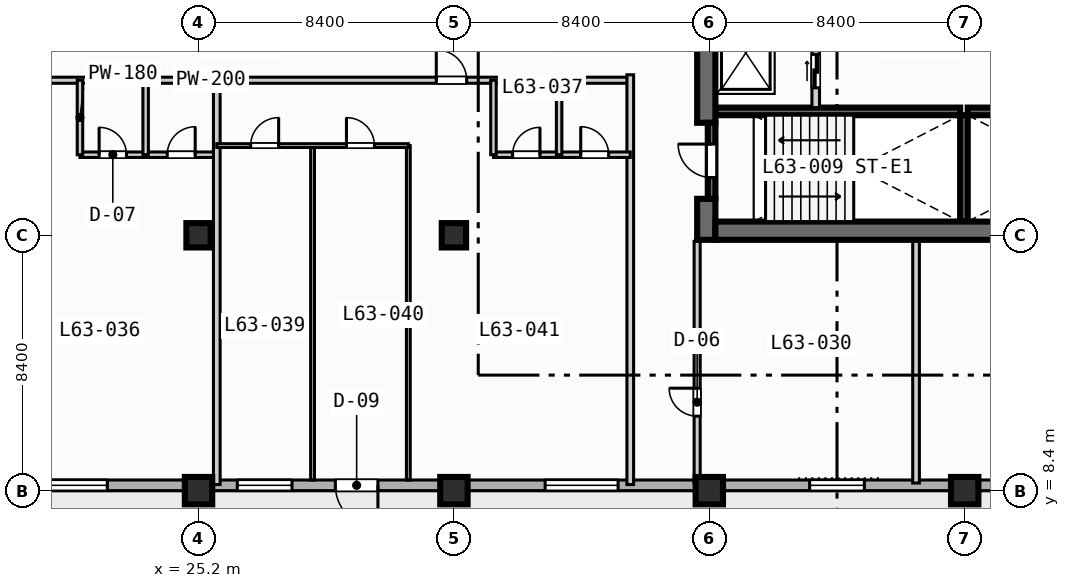
"""IFC4 building model, lengths in metres.
Left out: names, types, materials, properties, quantities, classifications, styles, units other than length and angle.
Written with IfcOpenShell. Run it as: python <this file> out.ifc"""

import sys

from ifc_helpers import new_model, si_unit, direction, frame, frame_2d, origin, origin_2d, place, context, subcontext, project, spatial, rectangle, extrude, element, fill, save


model = new_model("IFC4")
c1 = context("Model", 3, precision=1e-05, world=origin(), true_north=direction((0.0, 1.0)))
c2 = subcontext(c1, "Body", "Model", "MODEL_VIEW")
j1 = project(units=[si_unit("LENGTHUNIT", "METRE"), si_unit("PLANEANGLEUNIT", "RADIAN")], contexts=[c1])
p1 = place(None, origin())
s1 = spatial("IfcSite", under=j1, at=p1, CompositionType="ELEMENT")
p2 = place(p1, origin())
s2 = spatial("IfcBuilding", under=s1, at=p2, CompositionType="ELEMENT")
p3 = place(p2, frame((0.0, 0.0, 256.4)))
s3 = spatial("IfcBuildingStorey", under=s2, at=p3, CompositionType="ELEMENT", Elevation=256.4)
for number, where, z_axis, x_axis in (
    (1, (42.2, 20.875, 0.0), (0.0, 0.0, 1.0), (1.0, 0.0, 0.0)),
    (2, (50.5, 20.875, 0.0), (0.0, 0.0, 1.0), (1.0, 0.0, 0.0)),
):
    element("IfcWall", number, at=place(p3, frame(where, z_axis=z_axis, x_axis=x_axis)), inside=s3, PredefinedType="SOLIDWALL", context=c2, shape_type="SweptSolid", body=[
        extrude(rectangle(XDim=8.05, YDim=0.25, at=frame_2d((4.025, 0.0))), origin(), (0.0, 0.0, 1.0), 3.47),
    ])
p4 = place(p3, frame((50.375, 17.25, 0.0), z_axis=(0.0, 0.0, 1.0), x_axis=(0.0, 1.0, 0.0)))
e3 = element("IfcWall", 3, at=p4, inside=s3, PredefinedType="SOLIDWALL", context=c2, shape_type="SweptSolid", body=[
    extrude(rectangle(XDim=3.5, YDim=0.25, at=frame_2d((1.75, 0.0))), origin(), (0.0, 0.0, 1.0), 3.47),
])
p5 = place(p3, frame((41.9, 16.65, 0.0), z_axis=(0.0, 0.0, 1.0), x_axis=(0.0, 1.0, 0.0)))
e4 = element("IfcWall", 4, at=p5, inside=s3, PredefinedType="SHEAR", context=c2, shape_type="SweptSolid", body=[
    extrude(rectangle(XDim=1.35, YDim=0.6, at=frame_2d((0.675, 0.0))), origin(), (0.0, 0.0, 1.0), 3.47),
])
p6 = place(p3, frame((41.9, 20.5, 0.0), z_axis=(0.0, 0.0, 1.0), x_axis=(0.0, 1.0, 0.0)))
e5 = element("IfcWall", 5, at=p6, inside=s3, PredefinedType="SHEAR", context=c2, shape_type="SweptSolid", body=[
    extrude(rectangle(XDim=5.0, YDim=0.6, at=frame_2d((2.5, 0.0))), origin(), (0.0, 0.0, 1.0), 3.47),
])
p7 = place(p3, frame((42.2, 16.95, 0.0), z_axis=(0.0, 0.0, 1.0), x_axis=(1.0, 0.0, 0.0)))
e6 = element("IfcWall", 6, at=p7, inside=s3, PredefinedType="SHEAR", context=c2, shape_type="SweptSolid", body=[
    extrude(rectangle(XDim=16.35, YDim=0.6, at=frame_2d((8.175, 0.0))), origin(), (0.0, 0.0, 1.0), 3.47),
])
p8 = place(p3, frame((25.2, 8.4, 0.0), z_axis=(0.0, 0.0, 1.0), x_axis=(1.0, 0.0, 0.0)))
e7 = element("IfcColumn", 7, at=p8, inside=s3, PredefinedType="COLUMN", context=c2, shape_type="SweptSolid", body=[
    extrude(rectangle(XDim=0.9, YDim=0.9, at=origin_2d()), origin(), (0.0, 0.0, 1.0), 3.7),
])
p9 = place(p3, frame((25.2, 16.8, 0.0), z_axis=(0.0, 0.0, 1.0), x_axis=(1.0, 0.0, 0.0)))
e8 = element("IfcColumn", 8, at=p9, inside=s3, PredefinedType="COLUMN", context=c2, shape_type="SweptSolid", body=[
    extrude(rectangle(XDim=0.8, YDim=0.8, at=origin_2d()), origin(), (0.0, 0.0, 1.0), 3.7),
])
p10 = place(p3, frame((33.6, 8.4, 0.0), z_axis=(0.0, 0.0, 1.0), x_axis=(1.0, 0.0, 0.0)))
e9 = element("IfcColumn", 9, at=p10, inside=s3, PredefinedType="COLUMN", context=c2, shape_type="SweptSolid", body=[
    extrude(rectangle(XDim=0.9, YDim=0.9, at=origin_2d()), origin(), (0.0, 0.0, 1.0), 3.7),
])
p11 = place(p3, frame((33.6, 16.8, 0.0), z_axis=(0.0, 0.0, 1.0), x_axis=(1.0, 0.0, 0.0)))
e10 = element("IfcColumn", 10, at=p11, inside=s3, PredefinedType="COLUMN", context=c2, shape_type="SweptSolid", body=[
    extrude(rectangle(XDim=0.8, YDim=0.8, at=origin_2d()), origin(), (0.0, 0.0, 1.0), 3.7),
])
for number, where, z_axis, x_axis in (
    (11, (42.0, 8.4, 0.0), (0.0, 0.0, 1.0), (1.0, 0.0, 0.0)),
    (12, (50.4, 8.4, 0.0), (0.0, 0.0, 1.0), (1.0, 0.0, 0.0)),
):
    element("IfcColumn", number, at=place(p3, frame(where, z_axis=z_axis, x_axis=x_axis)), inside=s3, PredefinedType="COLUMN", context=c2, shape_type="SweptSolid", body=[
        extrude(rectangle(XDim=0.9, YDim=0.9, at=origin_2d()), origin(), (0.0, 0.0, 1.0), 3.7),
    ])
p12 = place(p3, frame((72.425, 8.575, 0.0), z_axis=(0.0, 0.0, 1.0), x_axis=(-1.0, 0.0, 0.0)))
e13 = element("IfcWall", 13, at=p12, inside=s3, PredefinedType="STANDARD", context=c2, shape_type="SweptSolid", body=[
    extrude(rectangle(XDim=60.85, YDim=0.35, at=frame_2d((30.425, 0.0))), origin(), (0.0, 0.0, 1.0), 3.47),
])
p13 = place(p12, frame((41.325, 0.0, 0.0)))
e14 = element("IfcOpeningElement", 14, at=p13, cuts=e13, PredefinedType="OPENING", context=c2, shape_type="SweptSolid", body=[
    extrude(rectangle(XDim=1.4, YDim=2.2, at=frame_2d((0.7, 1.1))), frame((0.0, 0.185, 0.0), z_axis=(0.0, -1.0, 0.0), x_axis=(1.0, 0.0, 0.0)), (0.0, 0.0, 1.0), 0.37),
])
p14 = place(p12, frame((50.225, 0.0, 0.85)))
e15 = element("IfcOpeningElement", 15, at=p14, cuts=e13, PredefinedType="OPENING", context=c2, shape_type="SweptSolid", body=[
    extrude(rectangle(XDim=2.4, YDim=1.95, at=frame_2d((1.2, 0.975))), frame((0.0, 0.185, 0.0), z_axis=(0.0, -1.0, 0.0), x_axis=(1.0, 0.0, 0.0)), (0.0, 0.0, 1.0), 0.37),
])
p15 = place(p12, frame((33.425, 0.0, 0.85)))
e16 = element("IfcOpeningElement", 16, at=p15, cuts=e13, PredefinedType="OPENING", context=c2, shape_type="SweptSolid", body=[
    extrude(rectangle(XDim=2.4, YDim=1.95, at=frame_2d((1.2, 0.975))), frame((0.0, 0.185, 0.0), z_axis=(0.0, -1.0, 0.0), x_axis=(1.0, 0.0, 0.0)), (0.0, 0.0, 1.0), 0.37),
])
p16 = place(p12, frame((25.325, 0.0, 0.85)))
e17 = element("IfcOpeningElement", 17, at=p16, cuts=e13, PredefinedType="OPENING", context=c2, shape_type="SweptSolid", body=[
    extrude(rectangle(XDim=1.8, YDim=1.8, at=frame_2d((0.9, 0.9))), frame((0.0, 0.185, 0.0), z_axis=(0.0, -1.0, 0.0), x_axis=(1.0, 0.0, 0.0)), (0.0, 0.0, 1.0), 0.37),
])
p17 = place(p12, frame((58.15, 0.0, 0.85)))
e18 = element("IfcOpeningElement", 18, at=p17, cuts=e13, PredefinedType="OPENING", context=c2, shape_type="SweptSolid", body=[
    extrude(rectangle(XDim=1.8, YDim=1.8, at=frame_2d((0.9, 0.9))), frame((0.0, 0.185, 0.0), z_axis=(0.0, -1.0, 0.0), x_axis=(1.0, 0.0, 0.0)), (0.0, 0.0, 1.0), 0.37),
])
p18 = place(p12, frame((56.29, 0.0, 0.85)))
e19 = element("IfcOpeningElement", 19, at=p18, cuts=e13, PredefinedType="OPENING", context=c2, shape_type="SweptSolid", body=[
    extrude(rectangle(XDim=0.72, YDim=1.8, at=frame_2d((0.36, 0.9))), frame((0.0, 0.185, 0.0), z_axis=(0.0, -1.0, 0.0), x_axis=(1.0, 0.0, 0.0)), (0.0, 0.0, 1.0), 0.37),
])
p19 = place(p12, frame((44.15, 0.0, 0.85)))
e20 = element("IfcOpeningElement", 20, at=p19, cuts=e13, PredefinedType="OPENING", context=c2, shape_type="SweptSolid", body=[
    extrude(rectangle(XDim=1.8, YDim=1.8, at=frame_2d((0.9, 0.9))), frame((0.0, 0.185, 0.0), z_axis=(0.0, -1.0, 0.0), x_axis=(1.0, 0.0, 0.0)), (0.0, 0.0, 1.0), 0.37),
])
p20 = place(p3, frame((42.075, 18.0, 0.0), z_axis=(0.0, 0.0, 1.0), x_axis=(0.0, 1.0, 0.0)))
e21 = element("IfcWall", 21, at=p20, inside=s3, PredefinedType="SOLIDWALL", context=c2, shape_type="SweptSolid", body=[
    extrude(rectangle(XDim=2.5, YDim=0.25, at=frame_2d((1.25, 0.0))), origin(), (0.0, 0.0, 1.0), 3.47),
])
p21 = place(p20, frame((0.7, 0.0, 0.0)))
e22 = element("IfcOpeningElement", 22, at=p21, cuts=e21, PredefinedType="OPENING", context=c2, shape_type="SweptSolid", body=[
    extrude(rectangle(XDim=1.1, YDim=2.15, at=frame_2d((0.55, 1.075))), frame((0.0, 0.135, 0.0), z_axis=(0.0, -1.0, 0.0), x_axis=(1.0, 0.0, 0.0)), (0.0, 0.0, 1.0), 0.27),
])
p22 = place(p3, frame((45.5, 21.0, 0.0), z_axis=(0.0, 0.0, 1.0), x_axis=(0.0, 1.0, 0.0)))
e23 = element("IfcWall", 23, at=p22, inside=s3, PredefinedType="SOLIDWALL", context=c2, shape_type="SweptSolid", body=[
    extrude(rectangle(XDim=4.15, YDim=0.25, at=frame_2d((2.075, 0.0))), origin(), (0.0, 0.0, 1.0), 3.47),
])
p23 = place(p22, frame((0.65, 0.0, 0.0)))
e24 = element("IfcOpeningElement", 24, at=p23, cuts=e23, PredefinedType="OPENING", context=c2, shape_type="SweptSolid", body=[
    extrude(rectangle(XDim=1.1, YDim=2.15, at=frame_2d((0.55, 1.075))), frame((0.0, 0.135, 0.0), z_axis=(0.0, -1.0, 0.0), x_axis=(1.0, 0.0, 0.0)), (0.0, 0.0, 1.0), 0.27),
])
p24 = place(p3, frame((41.6, 8.65, 0.0), z_axis=(0.0, 0.0, 1.0), x_axis=(0.0, 1.0, 0.0)))
e25 = element("IfcWall", 25, at=p24, inside=s3, PredefinedType="PARTITIONING", context=c2, shape_type="SweptSolid", body=[
    extrude(rectangle(XDim=7.95, YDim=0.2, at=frame_2d((3.975, 0.0))), origin(), (0.0, 0.0, 1.0), 3.47),
])
p25 = place(p24, frame((2.2, 0.0, 0.0)))
e26 = element("IfcOpeningElement", 26, at=p25, cuts=e25, PredefinedType="OPENING", context=c2, shape_type="SweptSolid", body=[
    extrude(rectangle(XDim=0.92, YDim=2.1, at=frame_2d((0.46, 1.05))), frame((0.0, 0.11, 0.0), z_axis=(0.0, -1.0, 0.0), x_axis=(1.0, 0.0, 0.0)), (0.0, 0.0, 1.0), 0.22),
])
p26 = place(p3, frame((48.8, 8.65, 0.0), z_axis=(0.0, 0.0, 1.0), x_axis=(0.0, 1.0, 0.0)))
e27 = element("IfcWall", 27, at=p26, inside=s3, PredefinedType="PARTITIONING", context=c2, shape_type="SweptSolid", body=[
    extrude(rectangle(XDim=7.95, YDim=0.22, at=frame_2d((3.975, 0.0))), origin(), (0.0, 0.0, 1.0), 3.47),
])
p27 = place(p3, frame((11.8, 21.9, 0.0), z_axis=(0.0, 0.0, 1.0), x_axis=(1.0, 0.0, 0.0)))
e28 = element("IfcWall", 28, at=p27, inside=s3, PredefinedType="PARTITIONING", context=c2, shape_type="SweptSolid", body=[
    extrude(rectangle(XDim=27.6, YDim=0.2, at=frame_2d((13.8, 0.0))), origin(), (0.0, 0.0, 1.0), 3.47),
])
p28 = place(p27, frame((7.42, 0.0, 0.0)))
e29 = element("IfcOpeningElement", 29, at=p28, cuts=e28, PredefinedType="OPENING", context=c2, shape_type="SweptSolid", body=[
    extrude(rectangle(XDim=1.0, YDim=2.15, at=frame_2d((0.5, 1.075))), frame((0.0, 0.11, 0.0), z_axis=(0.0, -1.0, 0.0), x_axis=(1.0, 0.0, 0.0)), (0.0, 0.0, 1.0), 0.22),
])
p29 = place(p27, frame((21.22, 0.0, 0.0)))
e30 = element("IfcOpeningElement", 30, at=p29, cuts=e28, PredefinedType="OPENING", context=c2, shape_type="SweptSolid", body=[
    extrude(rectangle(XDim=1.0, YDim=2.15, at=frame_2d((0.5, 1.075))), frame((0.0, 0.11, 0.0), z_axis=(0.0, -1.0, 0.0), x_axis=(1.0, 0.0, 0.0)), (0.0, 0.0, 1.0), 0.22),
])
p30 = place(p3, frame((21.3, 19.45, 0.0), z_axis=(0.0, 0.0, 1.0), x_axis=(1.0, 0.0, 0.0)))
e31 = element("IfcWall", 31, at=p30, inside=s3, PredefinedType="PLUMBINGWALL", context=c2, shape_type="SweptSolid", body=[
    extrude(rectangle(XDim=4.5, YDim=0.18, at=frame_2d((2.25, 0.0))), origin(), (0.0, 0.0, 1.0), 3.47),
])
p31 = place(p30, frame((0.63, 0.0, 0.0)))
e32 = element("IfcOpeningElement", 32, at=p31, cuts=e31, PredefinedType="OPENING", context=c2, shape_type="SweptSolid", body=[
    extrude(rectangle(XDim=0.9, YDim=2.1, at=frame_2d((0.45, 1.05))), frame((0.0, 0.1, 0.0), z_axis=(0.0, -1.0, 0.0), x_axis=(1.0, 0.0, 0.0)), (0.0, 0.0, 1.0), 0.2),
])
p32 = place(p30, frame((2.87, 0.0, 0.0)))
e33 = element("IfcOpeningElement", 33, at=p32, cuts=e31, PredefinedType="OPENING", context=c2, shape_type="SweptSolid", body=[
    extrude(rectangle(XDim=0.92, YDim=2.1, at=frame_2d((0.46, 1.05))), frame((0.0, 0.1, 0.0), z_axis=(0.0, -1.0, 0.0), x_axis=(1.0, 0.0, 0.0)), (0.0, 0.0, 1.0), 0.2),
])
for number, where, z_axis, x_axis in (
    (34, (21.3, 19.45, 0.0), (0.0, 0.0, 1.0), (0.0, 1.0, 0.0)),
    (35, (23.46, 19.45, 0.0), (0.0, 0.0, 1.0), (0.0, 1.0, 0.0)),
):
    element("IfcWall", number, at=place(p3, frame(where, z_axis=z_axis, x_axis=x_axis)), inside=s3, PredefinedType="PLUMBINGWALL", context=c2, shape_type="SweptSolid", body=[
        extrude(rectangle(XDim=2.45, YDim=0.18, at=frame_2d((1.225, 0.0))), origin(), (0.0, 0.0, 1.0), 3.47),
    ])
for number, where, z_axis, x_axis in (
    (36, (25.8, 8.6, 0.0), (0.0, 0.0, 1.0), (0.0, 1.0, 0.0)),
    (37, (39.4, 8.6, 0.0), (0.0, 0.0, 1.0), (0.0, 1.0, 0.0)),
):
    element("IfcWall", number, at=place(p3, frame(where, z_axis=z_axis, x_axis=x_axis)), inside=s3, PredefinedType="PARTITIONING", context=c2, shape_type="SweptSolid", body=[
        extrude(rectangle(XDim=13.48, YDim=0.22, at=frame_2d((6.74, 0.0))), origin(), (0.0, 0.0, 1.0), 3.47),
    ])
p33 = place(p3, frame((34.9, 19.45, 0.0), z_axis=(0.0, 0.0, 1.0), x_axis=(1.0, 0.0, 0.0)))
e38 = element("IfcWall", 38, at=p33, inside=s3, PredefinedType="PLUMBINGWALL", context=c2, shape_type="SweptSolid", body=[
    extrude(rectangle(XDim=4.5, YDim=0.18, at=frame_2d((2.25, 0.0))), origin(), (0.0, 0.0, 1.0), 3.47),
])
p34 = place(p33, frame((0.63, 0.0, 0.0)))
e39 = element("IfcOpeningElement", 39, at=p34, cuts=e38, PredefinedType="OPENING", context=c2, shape_type="SweptSolid", body=[
    extrude(rectangle(XDim=0.9, YDim=2.1, at=frame_2d((0.45, 1.05))), frame((0.0, 0.1, 0.0), z_axis=(0.0, -1.0, 0.0), x_axis=(1.0, 0.0, 0.0)), (0.0, 0.0, 1.0), 0.2),
])
p35 = place(p33, frame((2.87, 0.0, 0.0)))
e40 = element("IfcOpeningElement", 40, at=p35, cuts=e38, PredefinedType="OPENING", context=c2, shape_type="SweptSolid", body=[
    extrude(rectangle(XDim=0.92, YDim=2.1, at=frame_2d((0.46, 1.05))), frame((0.0, 0.1, 0.0), z_axis=(0.0, -1.0, 0.0), x_axis=(1.0, 0.0, 0.0)), (0.0, 0.0, 1.0), 0.2),
])
for number, where, z_axis, x_axis in (
    (41, (34.9, 19.45, 0.0), (0.0, 0.0, 1.0), (0.0, 1.0, 0.0)),
    (42, (37.06, 19.45, 0.0), (0.0, 0.0, 1.0), (0.0, 1.0, 0.0)),
):
    element("IfcWall", number, at=place(p3, frame(where, z_axis=z_axis, x_axis=x_axis)), inside=s3, PredefinedType="PLUMBINGWALL", context=c2, shape_type="SweptSolid", body=[
        extrude(rectangle(XDim=2.45, YDim=0.18, at=frame_2d((1.225, 0.0))), origin(), (0.0, 0.0, 1.0), 3.47),
    ])
for number, where, z_axis, x_axis in (
    (43, (28.95, 8.75, 0.0), (0.0, 0.0, 1.0), (0.0, 1.0, 0.0)),
    (44, (32.1, 8.75, 0.0), (0.0, 0.0, 1.0), (0.0, 1.0, 0.0)),
):
    element("IfcWall", number, at=place(p3, frame(where, z_axis=z_axis, x_axis=x_axis)), inside=s3, PredefinedType="PARTITIONING", context=c2, shape_type="SweptSolid", body=[
        extrude(rectangle(XDim=11.0, YDim=0.125, at=frame_2d((5.5, 0.0))), origin(), (0.0, 0.0, 1.0), 3.47),
    ])
p36 = place(p3, frame((25.8, 19.75, 0.0), z_axis=(0.0, 0.0, 1.0), x_axis=(1.0, 0.0, 0.0)))
e45 = element("IfcWall", 45, at=p36, inside=s3, PredefinedType="PARTITIONING", context=c2, shape_type="SweptSolid", body=[
    extrude(rectangle(XDim=6.3, YDim=0.125, at=frame_2d((3.15, 0.0))), origin(), (0.0, 0.0, 1.0), 3.47),
])
p37 = place(p36, frame((1.115, 0.0, 0.0)))
e46 = element("IfcOpeningElement", 46, at=p37, cuts=e45, PredefinedType="OPENING", context=c2, shape_type="SweptSolid", body=[
    extrude(rectangle(XDim=0.92, YDim=2.1, at=frame_2d((0.46, 1.05))), frame((0.0, 0.073, 0.0), z_axis=(0.0, -1.0, 0.0), x_axis=(1.0, 0.0, 0.0)), (0.0, 0.0, 1.0), 0.145),
])
p38 = place(p36, frame((4.265, 0.0, 0.0)))
e47 = element("IfcOpeningElement", 47, at=p38, cuts=e45, PredefinedType="OPENING", context=c2, shape_type="SweptSolid", body=[
    extrude(rectangle(XDim=0.92, YDim=2.1, at=frame_2d((0.46, 1.05))), frame((0.0, 0.073, 0.0), z_axis=(0.0, -1.0, 0.0), x_axis=(1.0, 0.0, 0.0)), (0.0, 0.0, 1.0), 0.145),
])
p39 = place(p13, origin())
e48 = element("IfcDoor", 48, at=p39, inside=s3, OperationType="SINGLE_SWING_LEFT", PredefinedType="DOOR", context=c2, shape_type="SweptSolid", body=[
    extrude(rectangle(XDim=1.4, YDim=2.2, at=frame_2d((0.7, 1.1))), frame((0.0, 0.025, 0.0), z_axis=(0.0, -1.0, 0.0), x_axis=(1.0, 0.0, 0.0)), (0.0, 0.0, 1.0), 0.05),
])
fill(e14, e48)
p40 = place(p14, origin())
e49 = element("IfcWindow", 49, at=p40, inside=s3, PartitioningType="SINGLE_PANEL", PredefinedType="WINDOW", context=c2, shape_type="SweptSolid", body=[
    extrude(rectangle(XDim=2.4, YDim=1.95, at=frame_2d((1.2, 0.975))), frame((0.0, 0.03, 0.0), z_axis=(0.0, -1.0, 0.0), x_axis=(1.0, 0.0, 0.0)), (0.0, 0.0, 1.0), 0.06),
])
fill(e15, e49)
p41 = place(p15, origin())
e50 = element("IfcWindow", 50, at=p41, inside=s3, PartitioningType="SINGLE_PANEL", PredefinedType="WINDOW", context=c2, shape_type="SweptSolid", body=[
    extrude(rectangle(XDim=2.4, YDim=1.95, at=frame_2d((1.2, 0.975))), frame((0.0, 0.03, 0.0), z_axis=(0.0, -1.0, 0.0), x_axis=(1.0, 0.0, 0.0)), (0.0, 0.0, 1.0), 0.06),
])
fill(e16, e50)
p42 = place(p16, origin())
e51 = element("IfcWindow", 51, at=p42, inside=s3, PartitioningType="SINGLE_PANEL", PredefinedType="WINDOW", context=c2, shape_type="SweptSolid", body=[
    extrude(rectangle(XDim=1.8, YDim=1.8, at=frame_2d((0.9, 0.9))), frame((0.0, 0.03, 0.0), z_axis=(0.0, -1.0, 0.0), x_axis=(1.0, 0.0, 0.0)), (0.0, 0.0, 1.0), 0.06),
])
fill(e17, e51)
p43 = place(p19, origin())
e52 = element("IfcWindow", 52, at=p43, inside=s3, PartitioningType="SINGLE_PANEL", PredefinedType="WINDOW", context=c2, shape_type="SweptSolid", body=[
    extrude(rectangle(XDim=1.8, YDim=1.8, at=frame_2d((0.9, 0.9))), frame((0.0, 0.03, 0.0), z_axis=(0.0, -1.0, 0.0), x_axis=(1.0, 0.0, 0.0)), (0.0, 0.0, 1.0), 0.06),
])
fill(e20, e52)
p44 = place(p21, origin())
e53 = element("IfcDoor", 53, at=p44, inside=s3, OperationType="SINGLE_SWING_RIGHT", PredefinedType="DOOR", context=c2, shape_type="SweptSolid", body=[
    extrude(rectangle(XDim=1.1, YDim=2.15, at=frame_2d((0.55, 1.075))), frame((0.0, 0.025, 0.0), z_axis=(0.0, -1.0, 0.0), x_axis=(1.0, 0.0, 0.0)), (0.0, 0.0, 1.0), 0.05),
])
fill(e22, e53)
p45 = place(p23, origin())
e54 = element("IfcDoor", 54, at=p45, inside=s3, OperationType="SLIDING_TO_LEFT", PredefinedType="DOOR", context=c2, shape_type="SweptSolid", body=[
    extrude(rectangle(XDim=1.1, YDim=2.15, at=frame_2d((0.55, 1.075))), frame((0.0, 0.025, 0.0), z_axis=(0.0, -1.0, 0.0), x_axis=(1.0, 0.0, 0.0)), (0.0, 0.0, 1.0), 0.05),
])
fill(e24, e54)
p46 = place(p25, origin())
e55 = element("IfcDoor", 55, at=p46, inside=s3, OperationType="SINGLE_SWING_RIGHT", PredefinedType="DOOR", context=c2, shape_type="SweptSolid", body=[
    extrude(rectangle(XDim=0.92, YDim=2.1, at=frame_2d((0.46, 1.05))), frame((0.0, 0.025, 0.0), z_axis=(0.0, -1.0, 0.0), x_axis=(1.0, 0.0, 0.0)), (0.0, 0.0, 1.0), 0.05),
])
fill(e26, e55)
p47 = place(p29, origin())
e56 = element("IfcDoor", 56, at=p47, inside=s3, OperationType="SINGLE_SWING_LEFT", PredefinedType="DOOR", context=c2, shape_type="SweptSolid", body=[
    extrude(rectangle(XDim=1.0, YDim=2.15, at=frame_2d((0.5, 1.075))), frame((0.0, 0.025, 0.0), z_axis=(0.0, -1.0, 0.0), x_axis=(1.0, 0.0, 0.0)), (0.0, 0.0, 1.0), 0.05),
])
fill(e30, e56)
p48 = place(p31, origin())
e57 = element("IfcDoor", 57, at=p48, inside=s3, OperationType="SINGLE_SWING_LEFT", PredefinedType="DOOR", context=c2, shape_type="SweptSolid", body=[
    extrude(rectangle(XDim=0.9, YDim=2.1, at=frame_2d((0.45, 1.05))), frame((0.0, 0.025, 0.0), z_axis=(0.0, -1.0, 0.0), x_axis=(1.0, 0.0, 0.0)), (0.0, 0.0, 1.0), 0.05),
])
fill(e32, e57)
p49 = place(p32, origin())
e58 = element("IfcDoor", 58, at=p49, inside=s3, OperationType="SINGLE_SWING_RIGHT", PredefinedType="DOOR", context=c2, shape_type="SweptSolid", body=[
    extrude(rectangle(XDim=0.92, YDim=2.1, at=frame_2d((0.46, 1.05))), frame((0.0, 0.025, 0.0), z_axis=(0.0, -1.0, 0.0), x_axis=(1.0, 0.0, 0.0)), (0.0, 0.0, 1.0), 0.05),
])
fill(e33, e58)
p50 = place(p34, origin())
e59 = element("IfcDoor", 59, at=p50, inside=s3, OperationType="SINGLE_SWING_RIGHT", PredefinedType="DOOR", context=c2, shape_type="SweptSolid", body=[
    extrude(rectangle(XDim=0.9, YDim=2.1, at=frame_2d((0.45, 1.05))), frame((0.0, 0.025, 0.0), z_axis=(0.0, -1.0, 0.0), x_axis=(1.0, 0.0, 0.0)), (0.0, 0.0, 1.0), 0.05),
])
fill(e39, e59)
p51 = place(p35, origin())
e60 = element("IfcDoor", 60, at=p51, inside=s3, OperationType="SINGLE_SWING_LEFT", PredefinedType="DOOR", context=c2, shape_type="SweptSolid", body=[
    extrude(rectangle(XDim=0.92, YDim=2.1, at=frame_2d((0.46, 1.05))), frame((0.0, 0.025, 0.0), z_axis=(0.0, -1.0, 0.0), x_axis=(1.0, 0.0, 0.0)), (0.0, 0.0, 1.0), 0.05),
])
fill(e40, e60)
p52 = place(p37, origin())
e61 = element("IfcDoor", 61, at=p52, inside=s3, OperationType="SINGLE_SWING_RIGHT", PredefinedType="DOOR", context=c2, shape_type="SweptSolid", body=[
    extrude(rectangle(XDim=0.92, YDim=2.1, at=frame_2d((0.46, 1.05))), frame((0.0, 0.025, 0.0), z_axis=(0.0, -1.0, 0.0), x_axis=(1.0, 0.0, 0.0)), (0.0, 0.0, 1.0), 0.05),
])
fill(e46, e61)
p53 = place(p38, origin())
e62 = element("IfcDoor", 62, at=p53, inside=s3, OperationType="SINGLE_SWING_LEFT", PredefinedType="DOOR", context=c2, shape_type="SweptSolid", body=[
    extrude(rectangle(XDim=0.92, YDim=2.1, at=frame_2d((0.46, 1.05))), frame((0.0, 0.025, 0.0), z_axis=(0.0, -1.0, 0.0), x_axis=(1.0, 0.0, 0.0)), (0.0, 0.0, 1.0), 0.05),
])
fill(e47, e62)
save(model, sys.argv[1])
